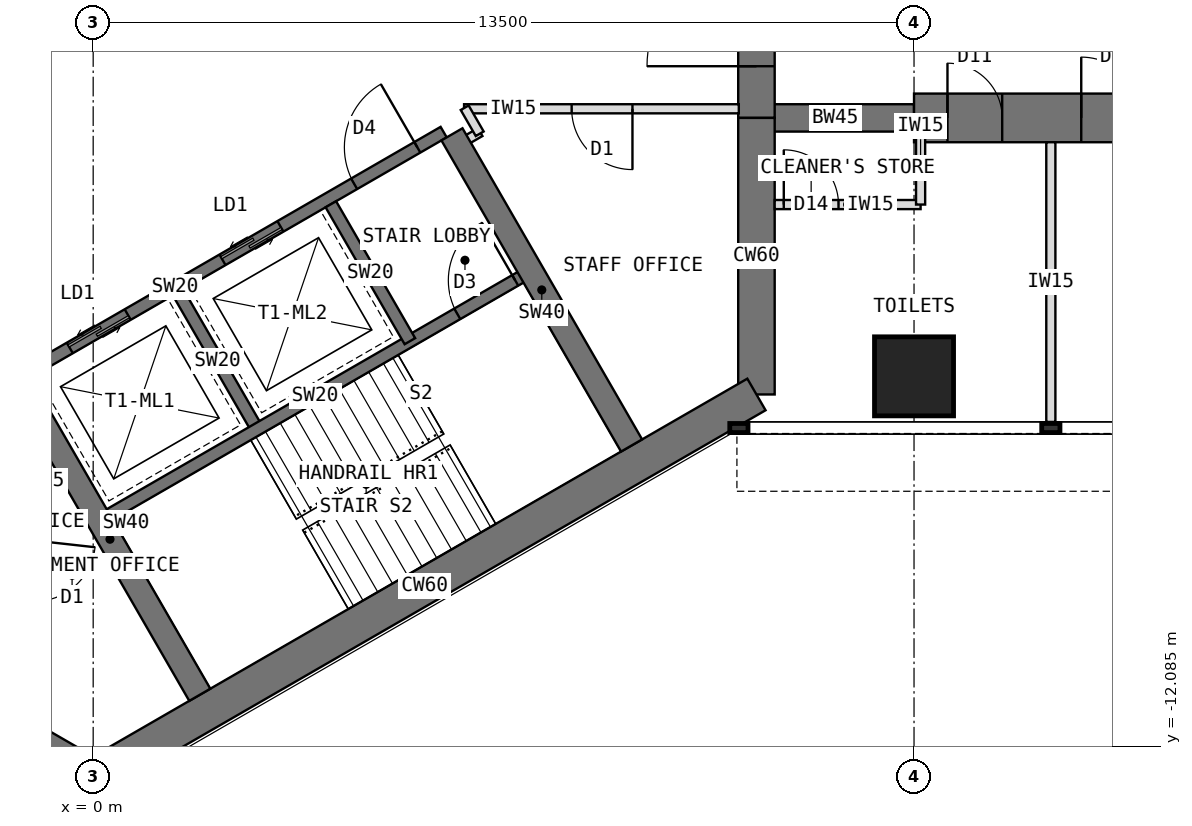
"""IFC4 building model, lengths in metres.
Left out: names, types, materials, properties, quantities, classifications, styles, units other than length and angle.
Written with IfcOpenShell. Run it as: python <this file> out.ifc"""

import sys

from ifc_helpers import new_model, si_unit, direction, frame, frame_2d, origin, origin_2d, place, context, subcontext, project, spatial, rectangle, extrude, element, fill, save


model = new_model("IFC4")
c1 = context("Model", 3, precision=1e-05, world=origin(), true_north=direction((0.0, 1.0)))
c2 = subcontext(c1, "Body", "Model", "MODEL_VIEW")
j1 = project(units=[si_unit("LENGTHUNIT", "METRE"), si_unit("PLANEANGLEUNIT", "RADIAN")], contexts=[c1])
p1 = place(None, origin())
s1 = spatial("IfcSite", under=j1, at=p1, CompositionType="ELEMENT")
p2 = place(p1, origin())
s2 = spatial("IfcBuilding", under=s1, at=p2, CompositionType="ELEMENT")
p3 = place(p2, frame((0.0, 0.0, 125.5)))
s3 = spatial("IfcBuildingStorey", under=s2, at=p3, CompositionType="ELEMENT", Elevation=125.5)
p4 = place(p3, frame((10.908, -6.298, 0.0), z_axis=(0.0, 0.0, 1.0), x_axis=(0.0, 1.0, 0.0)))
e1 = element("IfcWall", 1, at=p4, inside=s3, PredefinedType="SHEAR", context=c2, shape_type="SweptSolid", body=[
    extrude(rectangle(XDim=4.548, YDim=0.6, at=frame_2d((2.274, 0.0))), origin(), (0.0, 0.0, 1.0), 4.0),
])
p5 = place(p3, frame((10.908, -1.75, 0.0), z_axis=(0.0, 0.0, 1.0), x_axis=(0.0, 1.0, 0.0)))
e2 = element("IfcWall", 2, at=p5, inside=s3, PredefinedType="SHEAR", context=c2, shape_type="SweptSolid", body=[
    extrude(rectangle(XDim=3.5, YDim=0.6, at=frame_2d((1.75, 0.0))), origin(), (0.0, 0.0, 1.0), 4.0),
])
p6 = place(p5, frame((0.85, 0.0, 0.0)))
e3 = element("IfcOpeningElement", 3, at=p6, cuts=e2, PredefinedType="OPENING", context=c2, shape_type="SweptSolid", body=[
    extrude(rectangle(XDim=1.8, YDim=2.1, at=frame_2d((0.9, 1.05))), frame((0.0, 0.31, 0.0), z_axis=(0.0, -1.0, 0.0), x_axis=(1.0, 0.0, 0.0)), (0.0, 0.0, 1.0), 0.62),
])
p7 = place(p3, frame((-3.939, -10.322, 0.0), z_axis=(0.0, 0.0, 1.0), x_axis=(0.866011268655, -0.500024481964, 0.0)))
e4 = element("IfcWall", 4, at=p7, inside=s3, PredefinedType="SHEAR", context=c2, shape_type="SweptSolid", body=[
    extrude(rectangle(XDim=4.548, YDim=0.6, at=frame_2d((2.274, 0.0))), origin(), (0.0, 0.0, 1.0), 4.0),
])
p8 = place(p3, frame((0.0, -12.596, 0.0), z_axis=(0.0, 0.0, 1.0), x_axis=(0.866021940709, 0.500005998175, 0.0)))
e5 = element("IfcWall", 5, at=p8, inside=s3, PredefinedType="SHEAR", context=c2, shape_type="SweptSolid", body=[
    extrude(rectangle(XDim=12.596, YDim=0.6, at=frame_2d((6.298, 0.0))), origin(), (0.0, 0.0, 1.0), 4.0),
])
p9 = place(p3, frame((10.908, -1.75, 0.0), z_axis=(0.0, 0.0, 1.0), x_axis=(1.0, 0.0, 0.0)))
e6 = element("IfcWall", 6, at=p9, inside=s3, PredefinedType="SHEAR", context=c2, shape_type="SweptSolid", body=[
    extrude(rectangle(XDim=2.592, YDim=0.45, at=frame_2d((1.296, 0.0))), origin(), (0.0, 0.0, 1.0), 4.0),
])
p10 = place(p3, frame((13.5, -1.75, 0.0), z_axis=(0.0, 0.0, 1.0), x_axis=(1.0, 0.0, 0.0)))
e7 = element("IfcWall", 7, at=p10, inside=s3, PredefinedType="SHEAR", context=c2, shape_type="SweptSolid", body=[
    extrude(rectangle(XDim=13.2, YDim=0.8, at=frame_2d((6.6, 0.0))), origin(), (0.0, 0.0, 1.0), 4.0),
])
p11 = place(p10, frame((0.55, 0.0, 0.0)))
e8 = element("IfcOpeningElement", 8, at=p11, cuts=e7, PredefinedType="OPENING", context=c2, shape_type="SweptSolid", body=[
    extrude(rectangle(XDim=0.9, YDim=2.1, at=frame_2d((0.45, 1.05))), frame((0.0, 0.41, 0.0), z_axis=(0.0, -1.0, 0.0), x_axis=(1.0, 0.0, 0.0)), (0.0, 0.0, 1.0), 0.82),
])
p12 = place(p10, frame((2.75, 0.0, 0.0)))
e9 = element("IfcOpeningElement", 9, at=p12, cuts=e7, PredefinedType="OPENING", context=c2, shape_type="SweptSolid", body=[
    extrude(rectangle(XDim=1.0, YDim=2.1, at=frame_2d((0.5, 1.05))), frame((0.0, 0.41, 0.0), z_axis=(0.0, -1.0, 0.0), x_axis=(1.0, 0.0, 0.0)), (0.0, 0.0, 1.0), 0.82),
])
p13 = place(p10, frame((7.25, 0.0, 0.0)))
e10 = element("IfcOpeningElement", 10, at=p13, cuts=e7, PredefinedType="OPENING", context=c2, shape_type="SweptSolid", body=[
    extrude(rectangle(XDim=1.0, YDim=2.1, at=frame_2d((0.5, 1.05))), frame((0.0, 0.41, 0.0), z_axis=(0.0, -1.0, 0.0), x_axis=(1.0, 0.0, 0.0)), (0.0, 0.0, 1.0), 0.82),
])
p14 = place(p3, frame((13.5, -6.0, 0.0), z_axis=(0.0, 0.0, 1.0), x_axis=(1.0, 0.0, 0.0)))
e11 = element("IfcColumn", 11, at=p14, inside=s3, PredefinedType="COLUMN", context=c2, shape_type="SweptSolid", body=[
    extrude(rectangle(XDim=1.3, YDim=1.3, at=origin_2d()), origin(), (0.0, 0.0, 1.0), 4.0),
])
p15 = place(p3, frame((-1.164, -5.984, 0.0), z_axis=(0.0, 0.0, 1.0), x_axis=(0.866026010844, 0.49999894854, 0.0)))
e12 = element("IfcWall", 12, at=p15, inside=s3, PredefinedType="SHEAR", context=c2, shape_type="SweptSolid", body=[
    extrude(rectangle(XDim=8.0, YDim=0.2, at=frame_2d((4.0, 0.0))), origin(), (0.0, 0.0, 1.0), 4.0),
])
p16 = place(p15, frame((6.3, 0.0, 0.0)))
e13 = element("IfcOpeningElement", 13, at=p16, cuts=e12, PredefinedType="OPENING", context=c2, shape_type="SweptSolid", body=[
    extrude(rectangle(XDim=1.2, YDim=2.1, at=frame_2d((0.6, 1.05))), frame((0.0, 0.11, 0.0), z_axis=(0.0, -1.0, 0.0), x_axis=(1.0, 0.0, 0.0)), (0.0, 0.0, 1.0), 0.22),
])
p17 = place(p15, frame((0.9, 0.0, 0.0)))
e14 = element("IfcOpeningElement", 14, at=p17, cuts=e12, PredefinedType="OPENING", context=c2, shape_type="SweptSolid", body=[
    extrude(rectangle(XDim=1.1, YDim=2.2, at=frame_2d((0.55, 1.1))), frame((0.0, 0.11, 0.0), z_axis=(0.0, -1.0, 0.0), x_axis=(1.0, 0.0, 0.0)), (0.0, 0.0, 1.0), 0.22),
])
p18 = place(p15, frame((3.8, 0.0, 0.0)))
e15 = element("IfcOpeningElement", 15, at=p18, cuts=e12, PredefinedType="OPENING", context=c2, shape_type="SweptSolid", body=[
    extrude(rectangle(XDim=1.1, YDim=2.2, at=frame_2d((0.55, 1.1))), frame((0.0, 0.11, 0.0), z_axis=(0.0, -1.0, 0.0), x_axis=(1.0, 0.0, 0.0)), (0.0, 0.0, 1.0), 0.22),
])
p19 = place(p3, frame((1.397, -4.62, 0.0), z_axis=(0.0, 0.0, 1.0), x_axis=(0.499936506574, -0.866062058628, 0.0)))
e16 = element("IfcWall", 16, at=p19, inside=s3, PredefinedType="SHEAR", context=c2, shape_type="SweptSolid", body=[
    extrude(rectangle(XDim=2.6, YDim=0.2, at=frame_2d((1.3, 0.0))), origin(), (0.0, 0.0, 1.0), 4.0),
])
p20 = place(p3, frame((3.909, -3.17, 0.0), z_axis=(0.0, 0.0, 1.0), x_axis=(0.49997716683, -0.86603858612, 0.0)))
e17 = element("IfcWall", 17, at=p20, inside=s3, PredefinedType="SHEAR", context=c2, shape_type="SweptSolid", body=[
    extrude(rectangle(XDim=2.6, YDim=0.2, at=frame_2d((1.3, 0.0))), origin(), (0.0, 0.0, 1.0), 4.0),
])
p21 = place(p3, frame((0.186, -8.322, 0.0), z_axis=(0.0, 0.0, 1.0), x_axis=(0.866026010844, 0.49999894854, 0.0)))
e18 = element("IfcWall", 18, at=p21, inside=s3, PredefinedType="SHEAR", context=c2, shape_type="SweptSolid", body=[
    extrude(rectangle(XDim=8.0, YDim=0.2, at=frame_2d((4.0, 0.0))), origin(), (0.0, 0.0, 1.0), 4.0),
])
p22 = place(p21, frame((6.7, 0.0, 0.0)))
e19 = element("IfcOpeningElement", 19, at=p22, cuts=e18, PredefinedType="OPENING", context=c2, shape_type="SweptSolid", body=[
    extrude(rectangle(XDim=1.1, YDim=2.1, at=frame_2d((0.55, 1.05))), frame((0.0, 0.11, 0.0), z_axis=(0.0, -1.0, 0.0), x_axis=(1.0, 0.0, 0.0)), (0.0, 0.0, 1.0), 0.22),
])
p23 = place(p3, frame((5.901, -2.02, 0.0), z_axis=(0.0, 0.0, 1.0), x_axis=(0.500027676417, -0.866009424208, 0.0)))
e20 = element("IfcWall", 20, at=p23, inside=s3, PredefinedType="SHEAR", context=c2, shape_type="SweptSolid", body=[
    extrude(rectangle(XDim=5.908, YDim=0.4, at=frame_2d((2.954, 0.0))), origin(), (0.0, 0.0, 1.0), 4.0),
])
p24 = place(p3, frame((-1.201, -6.12, 0.0), z_axis=(0.0, 0.0, 1.0), x_axis=(0.49999668571, -0.866027317282, 0.0)))
e21 = element("IfcWall", 21, at=p24, inside=s3, PredefinedType="SHEAR", context=c2, shape_type="SweptSolid", body=[
    extrude(rectangle(XDim=5.908, YDim=0.4, at=frame_2d((2.954, 0.0))), origin(), (0.0, 0.0, 1.0), 4.0),
])
p25 = place(p3, frame((15.75, -2.15, 0.0), z_axis=(0.0, 0.0, 1.0), x_axis=(0.0, -1.0, 0.0)))
e22 = element("IfcWall", 22, at=p25, inside=s3, PredefinedType="PARTITIONING", context=c2, shape_type="SweptSolid", body=[
    extrude(rectangle(XDim=4.6, YDim=0.15, at=frame_2d((2.3, 0.0))), origin(), (0.0, 0.0, 1.0), 3.8),
])
p26 = place(p3, frame((11.208, -3.175, 0.0), z_axis=(0.0, 0.0, 1.0), x_axis=(1.0, 0.0, 0.0)))
e23 = element("IfcWall", 23, at=p26, inside=s3, PredefinedType="PARTITIONING", context=c2, shape_type="SweptSolid", body=[
    extrude(rectangle(XDim=2.4, YDim=0.15, at=frame_2d((1.2, 0.0))), origin(), (0.0, 0.0, 1.0), 3.8),
])
p27 = place(p26, frame((0.15, 0.0, 0.0)))
e24 = element("IfcOpeningElement", 24, at=p27, cuts=e23, PredefinedType="OPENING", context=c2, shape_type="SweptSolid", body=[
    extrude(rectangle(XDim=0.9, YDim=2.1, at=frame_2d((0.45, 1.05))), frame((0.0, 0.085, 0.0), z_axis=(0.0, -1.0, 0.0), x_axis=(1.0, 0.0, 0.0)), (0.0, 0.0, 1.0), 0.17),
])
p28 = place(p3, frame((13.608, -1.975, 0.0), z_axis=(0.0, 0.0, 1.0), x_axis=(0.0, -1.0, 0.0)))
e25 = element("IfcWall", 25, at=p28, inside=s3, PredefinedType="PARTITIONING", context=c2, shape_type="SweptSolid", body=[
    extrude(rectangle(XDim=1.2, YDim=0.15, at=frame_2d((0.6, 0.0))), origin(), (0.0, 0.0, 1.0), 3.8),
])
p29 = place(p3, frame((6.365, -1.983, 0.0), z_axis=(0.0, 0.0, 1.0), x_axis=(-0.865892400268, -0.500230298122, 0.0)))
e26 = element("IfcWall", 26, at=p29, inside=s3, PredefinedType="PARTITIONING", context=c2, shape_type="SweptSolid", body=[
    extrude(rectangle(XDim=0.43, YDim=0.15, at=frame_2d((0.215, 0.0))), origin(), (0.0, 0.0, 1.0), 3.8),
])
p30 = place(p3, frame((10.618, -1.6, 0.0), z_axis=(0.0, 0.0, 1.0), x_axis=(-1.0, 0.0, 0.0)))
e27 = element("IfcWall", 27, at=p30, inside=s3, PredefinedType="PARTITIONING", context=c2, shape_type="SweptSolid", body=[
    extrude(rectangle(XDim=4.519, YDim=0.15, at=frame_2d((2.259, 0.0))), origin(), (0.0, 0.0, 1.0), 3.8),
])
p31 = place(p30, frame((1.749, 0.0, 0.0)))
e28 = element("IfcOpeningElement", 28, at=p31, cuts=e27, PredefinedType="OPENING", context=c2, shape_type="SweptSolid", body=[
    extrude(rectangle(XDim=1.0, YDim=2.1, at=frame_2d((0.5, 1.05))), frame((0.0, 0.085, 0.0), z_axis=(0.0, -1.0, 0.0), x_axis=(1.0, 0.0, 0.0)), (0.0, 0.0, 1.0), 0.17),
])
p32 = place(p3, frame((6.11, -1.583, 0.0), z_axis=(0.0, 0.0, 1.0), x_axis=(0.50033519877, -0.865831790172, 0.0)))
e29 = element("IfcWall", 29, at=p32, inside=s3, PredefinedType="PARTITIONING", context=c2, shape_type="SweptSolid", body=[
    extrude(rectangle(XDim=0.494, YDim=0.15, at=frame_2d((0.247, 0.0))), origin(), (0.0, 0.0, 1.0), 3.8),
])
p33 = place(p16, origin())
e30 = element("IfcDoor", 30, at=p33, inside=s3, OperationType="SINGLE_SWING_RIGHT", PredefinedType="DOOR", context=c2, shape_type="SweptSolid", body=[
    extrude(rectangle(XDim=1.2, YDim=2.1, at=frame_2d((0.6, 1.05))), frame((0.0, 0.025, 0.0), z_axis=(0.0, -1.0, 0.0), x_axis=(1.0, 0.0, 0.0)), (0.0, 0.0, 1.0), 0.05),
])
fill(e13, e30)
p34 = place(p17, origin())
e31 = element("IfcDoor", 31, at=p34, inside=s3, OperationType="DOUBLE_DOOR_SLIDING", PredefinedType="DOOR", context=c2, shape_type="SweptSolid", body=[
    extrude(rectangle(XDim=1.1, YDim=2.2, at=frame_2d((0.55, 1.1))), frame((0.0, 0.025, 0.0), z_axis=(0.0, -1.0, 0.0), x_axis=(1.0, 0.0, 0.0)), (0.0, 0.0, 1.0), 0.05),
])
fill(e14, e31)
p35 = place(p18, origin())
e32 = element("IfcDoor", 32, at=p35, inside=s3, OperationType="DOUBLE_DOOR_SLIDING", PredefinedType="DOOR", context=c2, shape_type="SweptSolid", body=[
    extrude(rectangle(XDim=1.1, YDim=2.2, at=frame_2d((0.55, 1.1))), frame((0.0, 0.025, 0.0), z_axis=(0.0, -1.0, 0.0), x_axis=(1.0, 0.0, 0.0)), (0.0, 0.0, 1.0), 0.05),
])
fill(e15, e32)
p36 = place(p22, origin())
e33 = element("IfcDoor", 33, at=p36, inside=s3, OperationType="SINGLE_SWING_RIGHT", PredefinedType="DOOR", context=c2, shape_type="SweptSolid", body=[
    extrude(rectangle(XDim=1.1, YDim=2.1, at=frame_2d((0.55, 1.05))), frame((0.0, 0.025, 0.0), z_axis=(0.0, -1.0, 0.0), x_axis=(1.0, 0.0, 0.0)), (0.0, 0.0, 1.0), 0.05),
])
fill(e19, e33)
p37 = place(p6, origin())
e34 = element("IfcDoor", 34, at=p37, inside=s3, OperationType="DOUBLE_DOOR_DOUBLE_SWING", PredefinedType="DOOR", context=c2, shape_type="SweptSolid", body=[
    extrude(rectangle(XDim=1.72, YDim=2.06, at=frame_2d((0.9, 1.03))), frame((0.0, 0.025, 0.0), z_axis=(0.0, -1.0, 0.0), x_axis=(1.0, 0.0, 0.0)), (0.0, 0.0, 1.0), 0.05),
    extrude(rectangle(XDim=0.04, YDim=2.1, at=frame_2d((0.02, 1.05))), frame((0.0, 0.3, 0.0), z_axis=(0.0, -1.0, 0.0), x_axis=(1.0, 0.0, 0.0)), (0.0, 0.0, 1.0), 0.6),
    extrude(rectangle(XDim=0.04, YDim=2.1, at=frame_2d((1.78, 1.05))), frame((0.0, 0.3, 0.0), z_axis=(0.0, -1.0, 0.0), x_axis=(1.0, 0.0, 0.0)), (0.0, 0.0, 1.0), 0.6),
    extrude(rectangle(XDim=1.72, YDim=0.04, at=frame_2d((0.9, 2.08))), frame((0.0, 0.3, 0.0), z_axis=(0.0, -1.0, 0.0), x_axis=(1.0, 0.0, 0.0)), (0.0, 0.0, 1.0), 0.6),
])
fill(e3, e34)
p38 = place(p27, origin())
e35 = element("IfcDoor", 35, at=p38, inside=s3, OperationType="SINGLE_SWING_LEFT", PredefinedType="DOOR", context=c2, shape_type="SweptSolid", body=[
    extrude(rectangle(XDim=0.9, YDim=2.1, at=frame_2d((0.45, 1.05))), frame((0.0, 0.025, 0.0), z_axis=(0.0, -1.0, 0.0), x_axis=(1.0, 0.0, 0.0)), (0.0, 0.0, 1.0), 0.05),
])
fill(e24, e35)
p39 = place(p31, origin())
e36 = element("IfcDoor", 36, at=p39, inside=s3, OperationType="SINGLE_SWING_LEFT", PredefinedType="DOOR", context=c2, shape_type="SweptSolid", body=[
    extrude(rectangle(XDim=1.0, YDim=2.1, at=frame_2d((0.5, 1.05))), frame((0.0, 0.025, 0.0), z_axis=(0.0, -1.0, 0.0), x_axis=(1.0, 0.0, 0.0)), (0.0, 0.0, 1.0), 0.05),
])
fill(e28, e36)
p40 = place(p11, origin())
e37 = element("IfcDoor", 37, at=p40, inside=s3, OperationType="SINGLE_SWING_LEFT", PredefinedType="DOOR", context=c2, shape_type="SweptSolid", body=[
    extrude(rectangle(XDim=0.82, YDim=2.06, at=frame_2d((0.45, 1.03))), frame((0.0, 0.025, 0.0), z_axis=(0.0, -1.0, 0.0), x_axis=(1.0, 0.0, 0.0)), (0.0, 0.0, 1.0), 0.05),
    extrude(rectangle(XDim=0.04, YDim=2.1, at=frame_2d((0.02, 1.05))), frame((0.0, 0.4, 0.0), z_axis=(0.0, -1.0, 0.0), x_axis=(1.0, 0.0, 0.0)), (0.0, 0.0, 1.0), 0.8),
    extrude(rectangle(XDim=0.04, YDim=2.1, at=frame_2d((0.88, 1.05))), frame((0.0, 0.4, 0.0), z_axis=(0.0, -1.0, 0.0), x_axis=(1.0, 0.0, 0.0)), (0.0, 0.0, 1.0), 0.8),
    extrude(rectangle(XDim=0.82, YDim=0.04, at=frame_2d((0.45, 2.08))), frame((0.0, 0.4, 0.0), z_axis=(0.0, -1.0, 0.0), x_axis=(1.0, 0.0, 0.0)), (0.0, 0.0, 1.0), 0.8),
])
fill(e8, e37)
p41 = place(p12, origin())
e38 = element("IfcDoor", 38, at=p41, inside=s3, OperationType="SINGLE_SWING_LEFT", PredefinedType="DOOR", context=c2, shape_type="SweptSolid", body=[
    extrude(rectangle(XDim=0.92, YDim=2.06, at=frame_2d((0.5, 1.03))), frame((0.0, 0.025, 0.0), z_axis=(0.0, -1.0, 0.0), x_axis=(1.0, 0.0, 0.0)), (0.0, 0.0, 1.0), 0.05),
    extrude(rectangle(XDim=0.04, YDim=2.1, at=frame_2d((0.02, 1.05))), frame((0.0, 0.4, 0.0), z_axis=(0.0, -1.0, 0.0), x_axis=(1.0, 0.0, 0.0)), (0.0, 0.0, 1.0), 0.8),
    extrude(rectangle(XDim=0.04, YDim=2.1, at=frame_2d((0.98, 1.05))), frame((0.0, 0.4, 0.0), z_axis=(0.0, -1.0, 0.0), x_axis=(1.0, 0.0, 0.0)), (0.0, 0.0, 1.0), 0.8),
    extrude(rectangle(XDim=0.92, YDim=0.04, at=frame_2d((0.5, 2.08))), frame((0.0, 0.4, 0.0), z_axis=(0.0, -1.0, 0.0), x_axis=(1.0, 0.0, 0.0)), (0.0, 0.0, 1.0), 0.8),
])
fill(e9, e38)
save(model, sys.argv[1])
